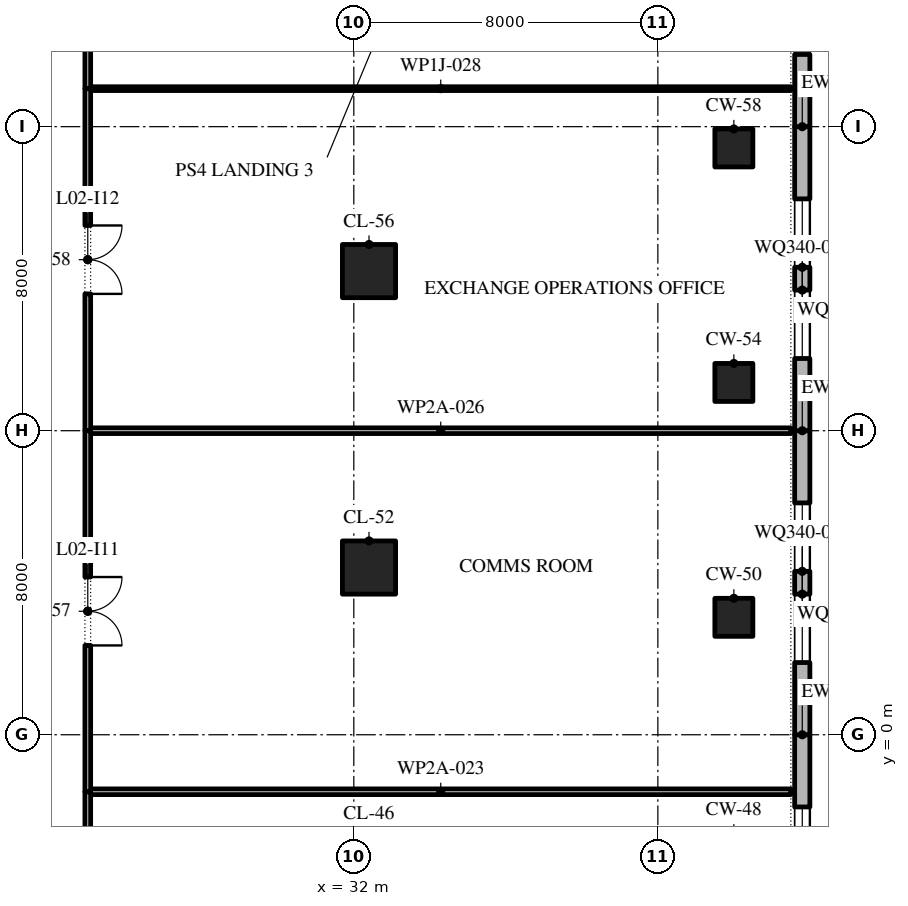
"""IFC4 building model, lengths in metres.
Left out: names, types, materials, properties, quantities, classifications, styles, units other than length and angle.
Written with IfcOpenShell. Run it as: python <this file> out.ifc"""

import sys

from ifc_helpers import new_model, si_unit, direction, frame, frame_2d, origin, origin_2d, place, context, subcontext, project, spatial, polyline, rectangle, outline, extrude, element, fill, save


model = new_model("IFC4")
c1 = context("Model", 3, precision=1e-05, world=origin(), true_north=direction((0.0, 1.0)))
c2 = subcontext(c1, "Body", "Model", "MODEL_VIEW")
j1 = project(units=[si_unit("LENGTHUNIT", "METRE"), si_unit("PLANEANGLEUNIT", "RADIAN")], contexts=[c1])
p1 = place(None, origin())
s1 = spatial("IfcSite", under=j1, at=p1, CompositionType="ELEMENT")
p2 = place(p1, origin())
s2 = spatial("IfcBuilding", under=s1, at=p2, CompositionType="ELEMENT")
p3 = place(p2, frame((0.0, 0.0, 14.0)))
s3 = spatial("IfcBuildingStorey", under=s2, at=p3, CompositionType="ELEMENT", Elevation=14.0)
p4 = place(p3, frame((42.0, 3.09, 0.0), z_axis=(0.0, 0.0, 1.0), x_axis=(1.0, 0.0, 0.0)))
e1 = element("IfcColumn", 1, at=p4, inside=s3, PredefinedType="COLUMN", context=c2, shape_type="SweptSolid", body=[
    extrude(rectangle(XDim=1.0, YDim=1.0, at=origin_2d()), origin(), (0.0, 0.0, 1.0), 5.2),
])
p5 = place(p3, frame((32.4, 4.4, 0.0), z_axis=(0.0, 0.0, 1.0), x_axis=(1.0, 0.0, 0.0)))
e2 = element("IfcColumn", 2, at=p5, inside=s3, PredefinedType="COLUMN", context=c2, shape_type="SweptSolid", body=[
    extrude(rectangle(XDim=1.4, YDim=1.4, at=origin_2d()), origin(), (0.0, 0.0, 1.0), 5.2),
])
p6 = place(p3, frame((42.0, 9.27, 0.0), z_axis=(0.0, 0.0, 1.0), x_axis=(1.0, 0.0, 0.0)))
e3 = element("IfcColumn", 3, at=p6, inside=s3, PredefinedType="COLUMN", context=c2, shape_type="SweptSolid", body=[
    extrude(rectangle(XDim=1.0, YDim=1.0, at=origin_2d()), origin(), (0.0, 0.0, 1.0), 5.2),
])
p7 = place(p3, frame((32.4, 12.2, 0.0), z_axis=(0.0, 0.0, 1.0), x_axis=(1.0, 0.0, 0.0)))
e4 = element("IfcColumn", 4, at=p7, inside=s3, PredefinedType="COLUMN", context=c2, shape_type="SweptSolid", body=[
    extrude(rectangle(XDim=1.4, YDim=1.4, at=origin_2d()), origin(), (0.0, 0.0, 1.0), 5.2),
])
p8 = place(p3, frame((42.0, 15.44, 0.0), z_axis=(0.0, 0.0, 1.0), x_axis=(1.0, 0.0, 0.0)))
e5 = element("IfcColumn", 5, at=p8, inside=s3, PredefinedType="COLUMN", context=c2, shape_type="SweptSolid", body=[
    extrude(rectangle(XDim=1.0, YDim=1.0, at=origin_2d()), origin(), (0.0, 0.0, 1.0), 5.2),
])
p9 = place(p3, frame((43.8, -8.0, 0.0), z_axis=(0.0, 0.0, 1.0), x_axis=(0.0, 1.0, 0.0)))
e6 = element("IfcWall", 6, at=p9, inside=s3, PredefinedType="STANDARD", context=c2, shape_type="SweptSolid", body=[
    extrude(rectangle(XDim=8.0, YDim=0.4, at=frame_2d((4.0, 0.0))), origin(), (0.0, 0.0, 1.0), 4.9),
])
p10 = place(p9, frame((1.9, 0.0, 0.9)))
e7 = element("IfcOpeningElement", 7, at=p10, cuts=e6, PredefinedType="OPENING", context=c2, shape_type="SweptSolid", body=[
    extrude(outline(polyline([(0.0, 0.0), (1.8, 0.0), (1.8, 1.841), (1.785, 2.076), (1.739, 2.307), (1.663, 2.53), (1.559, 2.741), (1.428, 2.937), (1.273, 3.114), (1.096, 3.269), (0.9, 3.4), (0.704, 3.269), (0.527, 3.114), (0.372, 2.937), (0.241, 2.741), (0.137, 2.53), (0.061, 2.307), (0.015, 2.076), (0.0, 1.841), (0.0, 0.0)])), frame((0.0, 0.21, 0.0), z_axis=(0.0, -1.0, 0.0), x_axis=(1.0, 0.0, 0.0)), (0.0, 0.0, 1.0), 0.42),
])
p11 = place(p9, frame((4.3, 0.0, 0.9)))
e8 = element("IfcOpeningElement", 8, at=p11, cuts=e6, PredefinedType="OPENING", context=c2, shape_type="SweptSolid", body=[
    extrude(outline(polyline([(0.0, 0.0), (1.8, 0.0), (1.8, 1.841), (1.785, 2.076), (1.739, 2.307), (1.663, 2.53), (1.559, 2.741), (1.428, 2.937), (1.273, 3.114), (1.096, 3.269), (0.9, 3.4), (0.704, 3.269), (0.527, 3.114), (0.372, 2.937), (0.241, 2.741), (0.137, 2.53), (0.061, 2.307), (0.015, 2.076), (0.0, 1.841), (0.0, 0.0)])), frame((0.0, 0.21, 0.0), z_axis=(0.0, -1.0, 0.0), x_axis=(1.0, 0.0, 0.0)), (0.0, 0.0, 1.0), 0.42),
])
p12 = place(p3, frame((43.8, 0.0, 0.0), z_axis=(0.0, 0.0, 1.0), x_axis=(0.0, 1.0, 0.0)))
e9 = element("IfcWall", 9, at=p12, inside=s3, PredefinedType="STANDARD", context=c2, shape_type="SweptSolid", body=[
    extrude(rectangle(XDim=8.0, YDim=0.4, at=frame_2d((4.0, 0.0))), origin(), (0.0, 0.0, 1.0), 4.9),
])
p13 = place(p12, frame((1.9, 0.0, 0.9)))
e10 = element("IfcOpeningElement", 10, at=p13, cuts=e9, PredefinedType="OPENING", context=c2, shape_type="SweptSolid", body=[
    extrude(outline(polyline([(0.0, 0.0), (1.8, 0.0), (1.8, 1.841), (1.785, 2.076), (1.739, 2.307), (1.663, 2.53), (1.559, 2.741), (1.428, 2.937), (1.273, 3.114), (1.096, 3.269), (0.9, 3.4), (0.704, 3.269), (0.527, 3.114), (0.372, 2.937), (0.241, 2.741), (0.137, 2.53), (0.061, 2.307), (0.015, 2.076), (0.0, 1.841), (0.0, 0.0)])), frame((0.0, 0.21, 0.0), z_axis=(0.0, -1.0, 0.0), x_axis=(1.0, 0.0, 0.0)), (0.0, 0.0, 1.0), 0.42),
])
p14 = place(p12, frame((4.3, 0.0, 0.9)))
e11 = element("IfcOpeningElement", 11, at=p14, cuts=e9, PredefinedType="OPENING", context=c2, shape_type="SweptSolid", body=[
    extrude(outline(polyline([(0.0, 0.0), (1.8, 0.0), (1.8, 1.841), (1.785, 2.076), (1.739, 2.307), (1.663, 2.53), (1.559, 2.741), (1.428, 2.937), (1.273, 3.114), (1.096, 3.269), (0.9, 3.4), (0.704, 3.269), (0.527, 3.114), (0.372, 2.937), (0.241, 2.741), (0.137, 2.53), (0.061, 2.307), (0.015, 2.076), (0.0, 1.841), (0.0, 0.0)])), frame((0.0, 0.21, 0.0), z_axis=(0.0, -1.0, 0.0), x_axis=(1.0, 0.0, 0.0)), (0.0, 0.0, 1.0), 0.42),
])
p15 = place(p3, frame((43.8, 8.0, 0.0), z_axis=(0.0, 0.0, 1.0), x_axis=(0.0, 1.0, 0.0)))
e12 = element("IfcWall", 12, at=p15, inside=s3, PredefinedType="STANDARD", context=c2, shape_type="SweptSolid", body=[
    extrude(rectangle(XDim=8.0, YDim=0.4, at=frame_2d((4.0, 0.0))), origin(), (0.0, 0.0, 1.0), 4.9),
])
p16 = place(p15, frame((1.9, 0.0, 0.9)))
e13 = element("IfcOpeningElement", 13, at=p16, cuts=e12, PredefinedType="OPENING", context=c2, shape_type="SweptSolid", body=[
    extrude(outline(polyline([(0.0, 0.0), (1.8, 0.0), (1.8, 1.841), (1.785, 2.076), (1.739, 2.307), (1.663, 2.53), (1.559, 2.741), (1.428, 2.937), (1.273, 3.114), (1.096, 3.269), (0.9, 3.4), (0.704, 3.269), (0.527, 3.114), (0.372, 2.937), (0.241, 2.741), (0.137, 2.53), (0.061, 2.307), (0.015, 2.076), (0.0, 1.841), (0.0, 0.0)])), frame((0.0, 0.21, 0.0), z_axis=(0.0, -1.0, 0.0), x_axis=(1.0, 0.0, 0.0)), (0.0, 0.0, 1.0), 0.42),
])
p17 = place(p15, frame((4.3, 0.0, 0.9)))
e14 = element("IfcOpeningElement", 14, at=p17, cuts=e12, PredefinedType="OPENING", context=c2, shape_type="SweptSolid", body=[
    extrude(outline(polyline([(0.0, 0.0), (1.8, 0.0), (1.8, 1.841), (1.785, 2.076), (1.739, 2.307), (1.663, 2.53), (1.559, 2.741), (1.428, 2.937), (1.273, 3.114), (1.096, 3.269), (0.9, 3.4), (0.704, 3.269), (0.527, 3.114), (0.372, 2.937), (0.241, 2.741), (0.137, 2.53), (0.061, 2.307), (0.015, 2.076), (0.0, 1.841), (0.0, 0.0)])), frame((0.0, 0.21, 0.0), z_axis=(0.0, -1.0, 0.0), x_axis=(1.0, 0.0, 0.0)), (0.0, 0.0, 1.0), 0.42),
])
p18 = place(p3, frame((43.8, 16.0, 0.0), z_axis=(0.0, 0.0, 1.0), x_axis=(0.0, 1.0, 0.0)))
e15 = element("IfcWall", 15, at=p18, inside=s3, PredefinedType="STANDARD", context=c2, shape_type="SweptSolid", body=[
    extrude(rectangle(XDim=8.0, YDim=0.4, at=frame_2d((4.0, 0.0))), origin(), (0.0, 0.0, 1.0), 4.9),
])
p19 = place(p18, frame((1.9, 0.0, 0.9)))
e16 = element("IfcOpeningElement", 16, at=p19, cuts=e15, PredefinedType="OPENING", context=c2, shape_type="SweptSolid", body=[
    extrude(outline(polyline([(0.0, 0.0), (1.8, 0.0), (1.8, 1.841), (1.785, 2.076), (1.739, 2.307), (1.663, 2.53), (1.559, 2.741), (1.428, 2.937), (1.273, 3.114), (1.096, 3.269), (0.9, 3.4), (0.704, 3.269), (0.527, 3.114), (0.372, 2.937), (0.241, 2.741), (0.137, 2.53), (0.061, 2.307), (0.015, 2.076), (0.0, 1.841), (0.0, 0.0)])), frame((0.0, 0.21, 0.0), z_axis=(0.0, -1.0, 0.0), x_axis=(1.0, 0.0, 0.0)), (0.0, 0.0, 1.0), 0.42),
])
p20 = place(p18, frame((4.3, 0.0, 0.9)))
e17 = element("IfcOpeningElement", 17, at=p20, cuts=e15, PredefinedType="OPENING", context=c2, shape_type="SweptSolid", body=[
    extrude(outline(polyline([(0.0, 0.0), (1.8, 0.0), (1.8, 1.841), (1.785, 2.076), (1.739, 2.307), (1.663, 2.53), (1.559, 2.741), (1.428, 2.937), (1.273, 3.114), (1.096, 3.269), (0.9, 3.4), (0.704, 3.269), (0.527, 3.114), (0.372, 2.937), (0.241, 2.741), (0.137, 2.53), (0.061, 2.307), (0.015, 2.076), (0.0, 1.841), (0.0, 0.0)])), frame((0.0, 0.21, 0.0), z_axis=(0.0, -1.0, 0.0), x_axis=(1.0, 0.0, 0.0)), (0.0, 0.0, 1.0), 0.42),
])
for number, where, z_axis, x_axis in (
    (18, (25.075, -1.5, 0.0), (0.0, 0.0, 1.0), (1.0, 0.0, 0.0)),
    (19, (25.075, 8.0, 0.0), (0.0, 0.0, 1.0), (1.0, 0.0, 0.0)),
):
    element("IfcWall", number, at=place(p3, frame(where, z_axis=z_axis, x_axis=x_axis)), inside=s3, PredefinedType="PARTITIONING", context=c2, shape_type="SweptSolid", body=[
        extrude(rectangle(XDim=18.425, YDim=0.15, at=frame_2d((9.212, 0.0))), origin(), (0.0, 0.0, 1.0), 4.9),
    ])
p21 = place(p3, frame((25.075, 17.0, 0.0), z_axis=(0.0, 0.0, 1.0), x_axis=(1.0, 0.0, 0.0)))
e20 = element("IfcWall", 20, at=p21, inside=s3, PredefinedType="PARTITIONING", context=c2, shape_type="SweptSolid", body=[
    extrude(rectangle(XDim=18.425, YDim=0.1, at=frame_2d((9.212, 0.0))), origin(), (0.0, 0.0, 1.0), 4.9),
])
p22 = place(p3, frame((25.0, -11.0, 0.0), z_axis=(0.0, 0.0, 1.0), x_axis=(0.0, 1.0, 0.0)))
e21 = element("IfcWall", 21, at=p22, inside=s3, PredefinedType="PARTITIONING", context=c2, shape_type="SweptSolid", body=[
    extrude(rectangle(XDim=9.5, YDim=0.15, at=frame_2d((4.75, 0.0))), origin(), (0.0, 0.0, 1.0), 4.9),
])
p23 = place(p22, frame((3.85, 0.0, 0.0)))
e22 = element("IfcOpeningElement", 22, at=p23, cuts=e21, PredefinedType="OPENING", context=c2, shape_type="SweptSolid", body=[
    extrude(rectangle(XDim=1.8, YDim=2.1, at=frame_2d((0.9, 1.05))), frame((0.0, 0.085, 0.0), z_axis=(0.0, -1.0, 0.0), x_axis=(1.0, 0.0, 0.0)), (0.0, 0.0, 1.0), 0.17),
])
p24 = place(p3, frame((25.0, -1.5, 0.0), z_axis=(0.0, 0.0, 1.0), x_axis=(0.0, 1.0, 0.0)))
e23 = element("IfcWall", 23, at=p24, inside=s3, PredefinedType="PARTITIONING", context=c2, shape_type="SweptSolid", body=[
    extrude(rectangle(XDim=9.5, YDim=0.15, at=frame_2d((4.75, 0.0))), origin(), (0.0, 0.0, 1.0), 4.9),
])
p25 = place(p24, frame((3.85, 0.0, 0.0)))
e24 = element("IfcOpeningElement", 24, at=p25, cuts=e23, PredefinedType="OPENING", context=c2, shape_type="SweptSolid", body=[
    extrude(rectangle(XDim=1.8, YDim=2.1, at=frame_2d((0.9, 1.05))), frame((0.0, 0.085, 0.0), z_axis=(0.0, -1.0, 0.0), x_axis=(1.0, 0.0, 0.0)), (0.0, 0.0, 1.0), 0.17),
])
p26 = place(p3, frame((25.0, 8.0, 0.0), z_axis=(0.0, 0.0, 1.0), x_axis=(0.0, 1.0, 0.0)))
e25 = element("IfcWall", 25, at=p26, inside=s3, PredefinedType="PARTITIONING", context=c2, shape_type="SweptSolid", body=[
    extrude(rectangle(XDim=9.0, YDim=0.15, at=frame_2d((4.5, 0.0))), origin(), (0.0, 0.0, 1.0), 4.9),
])
p27 = place(p26, frame((3.6, 0.0, 0.0)))
e26 = element("IfcOpeningElement", 26, at=p27, cuts=e25, PredefinedType="OPENING", context=c2, shape_type="SweptSolid", body=[
    extrude(rectangle(XDim=1.8, YDim=2.1, at=frame_2d((0.9, 1.05))), frame((0.0, 0.085, 0.0), z_axis=(0.0, -1.0, 0.0), x_axis=(1.0, 0.0, 0.0)), (0.0, 0.0, 1.0), 0.17),
])
p28 = place(p3, frame((25.0, 17.0, 0.0), z_axis=(0.0, 0.0, 1.0), x_axis=(0.0, 1.0, 0.0)))
e27 = element("IfcWall", 27, at=p28, inside=s3, PredefinedType="PARTITIONING", context=c2, shape_type="SweptSolid", body=[
    extrude(rectangle(XDim=9.0, YDim=0.15, at=frame_2d((4.5, 0.0))), origin(), (0.0, 0.0, 1.0), 4.9),
])
p29 = place(p28, frame((3.6, 0.0, 0.0)))
e28 = element("IfcOpeningElement", 28, at=p29, cuts=e27, PredefinedType="OPENING", context=c2, shape_type="SweptSolid", body=[
    extrude(rectangle(XDim=1.8, YDim=2.1, at=frame_2d((0.9, 1.05))), frame((0.0, 0.085, 0.0), z_axis=(0.0, -1.0, 0.0), x_axis=(1.0, 0.0, 0.0)), (0.0, 0.0, 1.0), 0.17),
])
p30 = place(p11, origin())
e29 = element("IfcWindow", 29, at=p30, inside=s3, PartitioningType="DOUBLE_PANEL_VERTICAL", PredefinedType="WINDOW", context=c2, shape_type="SweptSolid", body=[
    extrude(outline(polyline([(0.0, 0.0), (1.8, 0.0), (1.8, 1.841), (1.785, 2.076), (1.739, 2.307), (1.663, 2.53), (1.559, 2.741), (1.428, 2.937), (1.273, 3.114), (1.096, 3.269), (0.9, 3.4), (0.704, 3.269), (0.527, 3.114), (0.372, 2.937), (0.241, 2.741), (0.137, 2.53), (0.061, 2.307), (0.015, 2.076), (0.0, 1.841), (0.0, 0.0)])), frame((0.0, 0.03, 0.0), z_axis=(0.0, -1.0, 0.0), x_axis=(1.0, 0.0, 0.0)), (0.0, 0.0, 1.0), 0.06),
])
fill(e8, e29)
p31 = place(p13, origin())
e30 = element("IfcWindow", 30, at=p31, inside=s3, PartitioningType="DOUBLE_PANEL_VERTICAL", PredefinedType="WINDOW", context=c2, shape_type="SweptSolid", body=[
    extrude(outline(polyline([(0.0, 0.0), (1.8, 0.0), (1.8, 1.841), (1.785, 2.076), (1.739, 2.307), (1.663, 2.53), (1.559, 2.741), (1.428, 2.937), (1.273, 3.114), (1.096, 3.269), (0.9, 3.4), (0.704, 3.269), (0.527, 3.114), (0.372, 2.937), (0.241, 2.741), (0.137, 2.53), (0.061, 2.307), (0.015, 2.076), (0.0, 1.841), (0.0, 0.0)])), frame((0.0, 0.03, 0.0), z_axis=(0.0, -1.0, 0.0), x_axis=(1.0, 0.0, 0.0)), (0.0, 0.0, 1.0), 0.06),
])
fill(e10, e30)
p32 = place(p14, origin())
e31 = element("IfcWindow", 31, at=p32, inside=s3, PartitioningType="DOUBLE_PANEL_VERTICAL", PredefinedType="WINDOW", context=c2, shape_type="SweptSolid", body=[
    extrude(outline(polyline([(0.0, 0.0), (1.8, 0.0), (1.8, 1.841), (1.785, 2.076), (1.739, 2.307), (1.663, 2.53), (1.559, 2.741), (1.428, 2.937), (1.273, 3.114), (1.096, 3.269), (0.9, 3.4), (0.704, 3.269), (0.527, 3.114), (0.372, 2.937), (0.241, 2.741), (0.137, 2.53), (0.061, 2.307), (0.015, 2.076), (0.0, 1.841), (0.0, 0.0)])), frame((0.0, 0.03, 0.0), z_axis=(0.0, -1.0, 0.0), x_axis=(1.0, 0.0, 0.0)), (0.0, 0.0, 1.0), 0.06),
])
fill(e11, e31)
p33 = place(p16, origin())
e32 = element("IfcWindow", 32, at=p33, inside=s3, PartitioningType="DOUBLE_PANEL_VERTICAL", PredefinedType="WINDOW", context=c2, shape_type="SweptSolid", body=[
    extrude(outline(polyline([(0.0, 0.0), (1.8, 0.0), (1.8, 1.841), (1.785, 2.076), (1.739, 2.307), (1.663, 2.53), (1.559, 2.741), (1.428, 2.937), (1.273, 3.114), (1.096, 3.269), (0.9, 3.4), (0.704, 3.269), (0.527, 3.114), (0.372, 2.937), (0.241, 2.741), (0.137, 2.53), (0.061, 2.307), (0.015, 2.076), (0.0, 1.841), (0.0, 0.0)])), frame((0.0, 0.03, 0.0), z_axis=(0.0, -1.0, 0.0), x_axis=(1.0, 0.0, 0.0)), (0.0, 0.0, 1.0), 0.06),
])
fill(e13, e32)
p34 = place(p17, origin())
e33 = element("IfcWindow", 33, at=p34, inside=s3, PartitioningType="DOUBLE_PANEL_VERTICAL", PredefinedType="WINDOW", context=c2, shape_type="SweptSolid", body=[
    extrude(outline(polyline([(0.0, 0.0), (1.8, 0.0), (1.8, 1.841), (1.785, 2.076), (1.739, 2.307), (1.663, 2.53), (1.559, 2.741), (1.428, 2.937), (1.273, 3.114), (1.096, 3.269), (0.9, 3.4), (0.704, 3.269), (0.527, 3.114), (0.372, 2.937), (0.241, 2.741), (0.137, 2.53), (0.061, 2.307), (0.015, 2.076), (0.0, 1.841), (0.0, 0.0)])), frame((0.0, 0.03, 0.0), z_axis=(0.0, -1.0, 0.0), x_axis=(1.0, 0.0, 0.0)), (0.0, 0.0, 1.0), 0.06),
])
fill(e14, e33)
p35 = place(p19, origin())
e34 = element("IfcWindow", 34, at=p35, inside=s3, PartitioningType="DOUBLE_PANEL_VERTICAL", PredefinedType="WINDOW", context=c2, shape_type="SweptSolid", body=[
    extrude(outline(polyline([(0.0, 0.0), (1.8, 0.0), (1.8, 1.841), (1.785, 2.076), (1.739, 2.307), (1.663, 2.53), (1.559, 2.741), (1.428, 2.937), (1.273, 3.114), (1.096, 3.269), (0.9, 3.4), (0.704, 3.269), (0.527, 3.114), (0.372, 2.937), (0.241, 2.741), (0.137, 2.53), (0.061, 2.307), (0.015, 2.076), (0.0, 1.841), (0.0, 0.0)])), frame((0.0, 0.03, 0.0), z_axis=(0.0, -1.0, 0.0), x_axis=(1.0, 0.0, 0.0)), (0.0, 0.0, 1.0), 0.06),
])
fill(e16, e34)
p36 = place(p25, frame((1.8, 0.0, 0.0), z_axis=(0.0, 0.0, 1.0), x_axis=(-1.0, 0.0, 0.0)))
e35 = element("IfcDoor", 35, at=p36, inside=s3, OperationType="SINGLE_SWING_LEFT", PredefinedType="DOOR", context=c2, shape_type="SweptSolid", body=[
    extrude(rectangle(XDim=1.8, YDim=2.1, at=frame_2d((0.9, 1.05))), frame((0.0, 0.025, 0.0), z_axis=(0.0, -1.0, 0.0), x_axis=(1.0, 0.0, 0.0)), (0.0, 0.0, 1.0), 0.05),
])
fill(e24, e35)
p37 = place(p27, frame((1.8, 0.0, 0.0), z_axis=(0.0, 0.0, 1.0), x_axis=(-1.0, 0.0, 0.0)))
e36 = element("IfcDoor", 36, at=p37, inside=s3, OperationType="SINGLE_SWING_LEFT", PredefinedType="DOOR", context=c2, shape_type="SweptSolid", body=[
    extrude(rectangle(XDim=1.8, YDim=2.1, at=frame_2d((0.9, 1.05))), frame((0.0, 0.025, 0.0), z_axis=(0.0, -1.0, 0.0), x_axis=(1.0, 0.0, 0.0)), (0.0, 0.0, 1.0), 0.05),
])
fill(e26, e36)
save(model, sys.argv[1])
